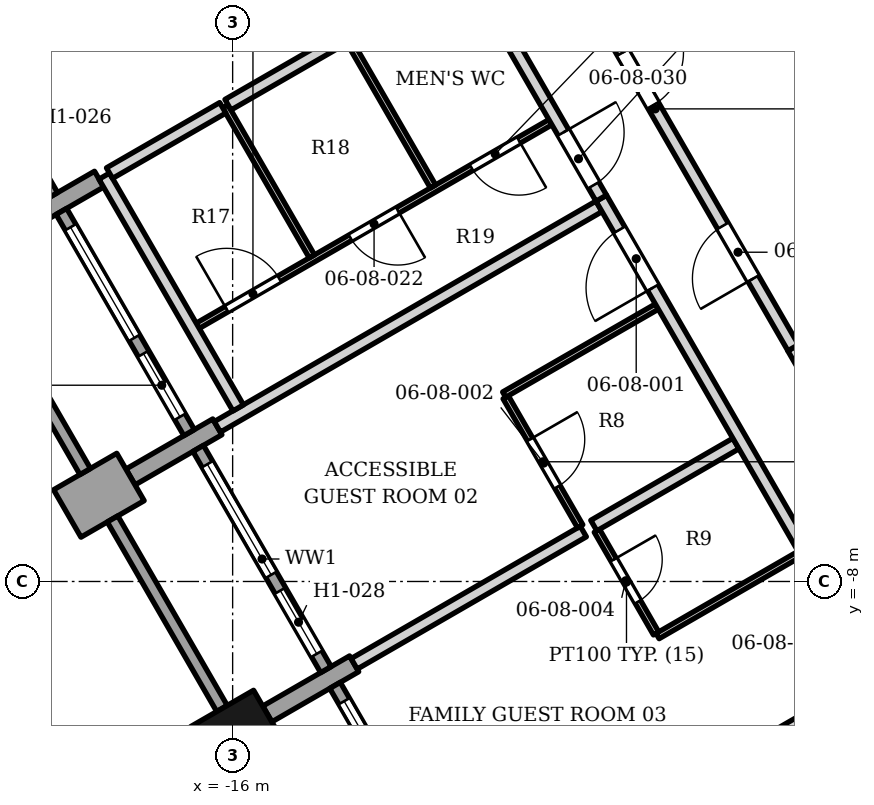
"""IFC4 building model, lengths in metres.
Left out: names, types, materials, properties, quantities, classifications, styles, units other than length and angle.
Written with IfcOpenShell. Run it as: python <this file> out.ifc"""

import sys

from ifc_helpers import new_model, si_unit, direction, frame, frame_2d, origin, origin_2d, place, context, subcontext, project, spatial, rectangle, extrude, element, fill, save


model = new_model("IFC4")
c1 = context("Model", 3, precision=1e-05, world=origin(), true_north=direction((0.0, 1.0)))
c2 = subcontext(c1, "Body", "Model", "MODEL_VIEW")
j1 = project(units=[si_unit("LENGTHUNIT", "METRE"), si_unit("PLANEANGLEUNIT", "RADIAN")], contexts=[c1])
p1 = place(None, origin())
s1 = spatial("IfcSite", under=j1, at=p1, CompositionType="ELEMENT")
p2 = place(p1, origin())
s2 = spatial("IfcBuilding", under=s1, at=p2, CompositionType="ELEMENT")
p3 = place(p2, frame((0.0, 0.0, 46.0)))
s3 = spatial("IfcBuildingStorey", under=s2, at=p3, CompositionType="ELEMENT", Elevation=46.0)
p4 = place(p3, frame((-15.95, -10.479, 0.0), z_axis=(0.0, 0.0, 1.0), x_axis=(0.5, -0.866025403784, 0.0)))
e1 = element("IfcColumn", 1, at=p4, inside=s3, PredefinedType="COLUMN", context=c2, shape_type="SweptSolid", body=[
    extrude(rectangle(XDim=0.9, YDim=1.2, at=origin_2d()), origin(), (0.0, 0.0, 1.0), 3.4),
])
p5 = place(p3, frame((-19.93, -2.384, 0.0), z_axis=(0.0, 0.0, 1.0), x_axis=(0.866057602843, 0.499944225447, 0.0)))
e2 = element("IfcWall", 2, at=p5, inside=s3, PredefinedType="SOLIDWALL", context=c2, shape_type="SweptSolid", body=[
    extrude(rectangle(XDim=2.001, YDim=0.3, at=frame_2d((1.0, 0.0))), origin(), (0.0, 0.0, 1.0), 2.65),
])
p6 = place(p3, frame((-18.72, -6.882, 0.0), z_axis=(0.0, 0.0, 1.0), x_axis=(0.866006032174, 0.500033551112, 0.0)))
e3 = element("IfcWall", 3, at=p6, inside=s3, PredefinedType="SOLIDWALL", context=c2, shape_type="SweptSolid", body=[
    extrude(rectangle(XDim=1.2, YDim=0.9, at=frame_2d((0.6, 0.0))), origin(), (0.0, 0.0, 1.0), 2.628),
])
for number, where, z_axis, x_axis in (
    (4, (-17.68, -6.282, 0.0), (0.0, 0.0, 1.0), (0.866, 0.5, 0.0)),
    (5, (-15.43, -10.179, 0.0), (0.0, 0.0, 1.0), (0.866, 0.5, 0.0)),
):
    element("IfcWall", number, at=place(p3, frame(where, z_axis=z_axis, x_axis=x_axis)), inside=s3, PredefinedType="SOLIDWALL", context=c2, shape_type="SweptSolid", body=[
        extrude(rectangle(XDim=1.65, YDim=0.3, at=frame_2d((0.825, 0.0))), origin(), (0.0, 0.0, 1.0), 2.65),
    ])
p7 = place(p3, frame((-21.066, 1.982, 0.0), z_axis=(0.0, 0.0, 1.0), x_axis=(0.500027713859, -0.866009402589, 0.0)))
e6 = element("IfcWall", 6, at=p7, inside=s3, PredefinedType="ELEMENTEDWALL", context=c2, shape_type="SweptSolid", body=[
    extrude(rectangle(XDim=4.2, YDim=0.2, at=frame_2d((2.1, 0.0))), origin(), (0.0, 0.0, 1.0), 2.65),
])
p8 = place(p7, frame((0.3, 0.0, 0.6)))
e7 = element("IfcOpeningElement", 7, at=p8, cuts=e6, PredefinedType="OPENING", context=c2, shape_type="SweptSolid", body=[
    extrude(rectangle(XDim=2.1, YDim=1.8, at=frame_2d((1.05, 0.9))), frame((0.0, 0.11, 0.0), z_axis=(0.0, -1.0, 0.0), x_axis=(1.0, 0.0, 0.0)), (0.0, 0.0, 1.0), 0.22),
])
p9 = place(p7, frame((2.7, 0.0, 0.0)))
e8 = element("IfcOpeningElement", 8, at=p9, cuts=e6, PredefinedType="OPENING", context=c2, shape_type="SweptSolid", body=[
    extrude(rectangle(XDim=1.2, YDim=2.4, at=frame_2d((0.6, 1.2))), frame((0.0, 0.11, 0.0), z_axis=(0.0, -1.0, 0.0), x_axis=(1.0, 0.0, 0.0)), (0.0, 0.0, 1.0), 0.22),
])
p10 = place(p3, frame((-20.225, -3.074, 0.0), z_axis=(0.0, 0.0, 1.0), x_axis=(0.500012057535, -0.866018442252, 0.0)))
e9 = element("IfcWall", 9, at=p10, inside=s3, PredefinedType="SOLIDWALL", context=c2, shape_type="SweptSolid", body=[
    extrude(rectangle(XDim=3.6, YDim=0.2, at=frame_2d((1.8, 0.0))), origin(), (0.0, 0.0, 1.0), 2.63),
])
p11 = place(p3, frame((-18.816, -1.915, 0.0), z_axis=(0.0, 0.0, 1.0), x_axis=(0.500002543286, -0.866023935413, 0.0)))
e10 = element("IfcWall", 10, at=p11, inside=s3, PredefinedType="ELEMENTEDWALL", context=c2, shape_type="SweptSolid", body=[
    extrude(rectangle(XDim=4.2, YDim=0.2, at=frame_2d((2.1, 0.0))), origin(), (0.0, 0.0, 1.0), 2.628),
])
p12 = place(p11, frame((0.3, 0.0, 0.6)))
e11 = element("IfcOpeningElement", 11, at=p12, cuts=e10, PredefinedType="OPENING", context=c2, shape_type="SweptSolid", body=[
    extrude(rectangle(XDim=2.1, YDim=1.8, at=frame_2d((1.05, 0.9))), frame((0.0, 0.11, 0.0), z_axis=(0.0, -1.0, 0.0), x_axis=(1.0, 0.0, 0.0)), (0.0, 0.0, 1.0), 0.22),
])
p13 = place(p11, frame((2.7, 0.0, 0.0)))
e12 = element("IfcOpeningElement", 12, at=p13, cuts=e10, PredefinedType="OPENING", context=c2, shape_type="SweptSolid", body=[
    extrude(rectangle(XDim=1.2, YDim=2.4, at=frame_2d((0.6, 1.2))), frame((0.0, 0.11, 0.0), z_axis=(0.0, -1.0, 0.0), x_axis=(1.0, 0.0, 0.0)), (0.0, 0.0, 1.0), 0.22),
])
p14 = place(p3, frame((-17.975, -6.971, 0.0), z_axis=(0.0, 0.0, 1.0), x_axis=(0.500012057535, -0.866018442252, 0.0)))
e13 = element("IfcWall", 13, at=p14, inside=s3, PredefinedType="SOLIDWALL", context=c2, shape_type="SweptSolid", body=[
    extrude(rectangle(XDim=3.6, YDim=0.2, at=frame_2d((1.8, 0.0))), origin(), (0.0, 0.0, 1.0), 2.63),
])
p15 = place(p3, frame((-16.566, -5.812, 0.0), z_axis=(0.0, 0.0, 1.0), x_axis=(0.500027713859, -0.866009402589, 0.0)))
e14 = element("IfcWall", 14, at=p15, inside=s3, PredefinedType="ELEMENTEDWALL", context=c2, shape_type="SweptSolid", body=[
    extrude(rectangle(XDim=4.2, YDim=0.2, at=frame_2d((2.1, 0.0))), origin(), (0.0, 0.0, 1.0), 2.65),
])
p16 = place(p15, frame((0.3, 0.0, 0.6)))
e15 = element("IfcOpeningElement", 15, at=p16, cuts=e14, PredefinedType="OPENING", context=c2, shape_type="SweptSolid", body=[
    extrude(rectangle(XDim=2.1, YDim=1.8, at=frame_2d((1.05, 0.9))), frame((0.0, 0.11, 0.0), z_axis=(0.0, -1.0, 0.0), x_axis=(1.0, 0.0, 0.0)), (0.0, 0.0, 1.0), 0.22),
])
p17 = place(p15, frame((2.7, 0.0, 0.0)))
e16 = element("IfcOpeningElement", 16, at=p17, cuts=e14, PredefinedType="OPENING", context=c2, shape_type="SweptSolid", body=[
    extrude(rectangle(XDim=1.2, YDim=2.4, at=frame_2d((0.6, 1.2))), frame((0.0, 0.11, 0.0), z_axis=(0.0, -1.0, 0.0), x_axis=(1.0, 0.0, 0.0)), (0.0, 0.0, 1.0), 0.22),
])
p18 = place(p3, frame((-14.316, -9.709, 0.0), z_axis=(0.0, 0.0, 1.0), x_axis=(0.500002543286, -0.866023935413, 0.0)))
e17 = element("IfcWall", 17, at=p18, inside=s3, PredefinedType="ELEMENTEDWALL", context=c2, shape_type="SweptSolid", body=[
    extrude(rectangle(XDim=4.2, YDim=0.2, at=frame_2d((2.1, 0.0))), origin(), (0.0, 0.0, 1.0), 2.302),
])
p19 = place(p18, frame((0.3, 0.0, 0.6)))
e18 = element("IfcOpeningElement", 18, at=p19, cuts=e17, PredefinedType="OPENING", context=c2, shape_type="SweptSolid", body=[
    extrude(rectangle(XDim=2.1, YDim=1.6, at=frame_2d((1.05, 0.8))), frame((0.0, 0.11, 0.0), z_axis=(0.0, -1.0, 0.0), x_axis=(1.0, 0.0, 0.0)), (0.0, 0.0, 1.0), 0.22),
])
p20 = place(p18, frame((2.7, 0.0, 0.0)))
e19 = element("IfcOpeningElement", 19, at=p20, cuts=e17, PredefinedType="OPENING", context=c2, shape_type="SweptSolid", body=[
    extrude(rectangle(XDim=1.2, YDim=2.2, at=frame_2d((0.6, 1.1))), frame((0.0, 0.11, 0.0), z_axis=(0.0, -1.0, 0.0), x_axis=(1.0, 0.0, 0.0)), (0.0, 0.0, 1.0), 0.22),
])
p21 = place(p3, frame((-11.751, -13.251, 0.0), z_axis=(0.0, 0.0, 1.0), x_axis=(0.866134002969, 0.499811853502, 0.0)))
e20 = element("IfcWall", 20, at=p21, inside=s3, PredefinedType="PARTITIONING", context=c2, shape_type="SweptSolid", body=[
    extrude(rectangle(XDim=7.25, YDim=0.2, at=frame_2d((3.625, 0.0))), origin(), (0.0, 0.0, 1.0), 2.302),
])
p22 = place(p21, frame((1.3, 0.0, 0.0)))
e21 = element("IfcOpeningElement", 21, at=p22, cuts=e20, PredefinedType="OPENING", context=c2, shape_type="SweptSolid", body=[
    extrude(rectangle(XDim=0.9, YDim=2.1, at=frame_2d((0.45, 1.05))), frame((0.0, 0.11, 0.0), z_axis=(0.0, -1.0, 0.0), x_axis=(1.0, 0.0, 0.0)), (0.0, 0.0, 1.0), 0.22),
])
p23 = place(p3, frame((-9.011, -8.898, 0.0), z_axis=(0.0, 0.0, 1.0), x_axis=(0.865671764241, 0.500612022024, 0.0)))
e22 = element("IfcWall", 22, at=p23, inside=s3, PredefinedType="PARTITIONING", context=c2, shape_type="SweptSolid", body=[
    extrude(rectangle(XDim=2.7, YDim=0.1, at=frame_2d((1.35, 0.0))), origin(), (0.0, 0.0, 1.0), 2.552),
])
p24 = place(p3, frame((-14.001, -9.354, 0.0), z_axis=(0.0, 0.0, 1.0), x_axis=(0.866024887666, 0.500000893942, 0.0)))
e23 = element("IfcWall", 23, at=p24, inside=s3, PredefinedType="PARTITIONING", context=c2, shape_type="SweptSolid", body=[
    extrude(rectangle(XDim=4.352, YDim=0.2, at=frame_2d((2.176, 0.0))), origin(), (0.0, 0.0, 1.0), 2.384),
])
p25 = place(p3, frame((-10.01, -7.165, 0.0), z_axis=(0.0, 0.0, 1.0), x_axis=(0.499317740681, -0.866418948224, 0.0)))
e24 = element("IfcWall", 24, at=p25, inside=s3, PredefinedType="PARTITIONING", context=c2, shape_type="SweptSolid", body=[
    extrude(rectangle(XDim=1.95, YDim=0.1, at=frame_2d((0.975, 0.0))), origin(), (0.0, 0.0, 1.0), 2.552),
])
p26 = place(p25, frame((0.55, 0.0, 0.0)))
e25 = element("IfcOpeningElement", 25, at=p26, cuts=e24, PredefinedType="OPENING", context=c2, shape_type="SweptSolid", body=[
    extrude(rectangle(XDim=0.8, YDim=2.1, at=frame_2d((0.4, 1.05))), frame((0.0, 0.06, 0.0), z_axis=(0.0, -1.0, 0.0), x_axis=(1.0, 0.0, 0.0)), (0.0, 0.0, 1.0), 0.12),
])
p27 = place(p3, frame((-10.06, -7.081, 0.0), z_axis=(0.0, 0.0, 1.0), x_axis=(0.866036505625, 0.499980770555, 0.0)))
e26 = element("IfcWall", 26, at=p27, inside=s3, PredefinedType="PARTITIONING", context=c2, shape_type="SweptSolid", body=[
    extrude(rectangle(XDim=2.7, YDim=0.2, at=frame_2d((1.35, 0.0))), origin(), (0.0, 0.0, 1.0), 2.552),
])
p28 = place(p3, frame((-11.509, -4.97, 0.0), z_axis=(0.0, 0.0, 1.0), x_axis=(0.500018594424, -0.866014668023, 0.0)))
e27 = element("IfcWall", 27, at=p28, inside=s3, PredefinedType="PARTITIONING", context=c2, shape_type="SweptSolid", body=[
    extrude(rectangle(XDim=2.45, YDim=0.1, at=frame_2d((1.225, 0.0))), origin(), (0.0, 0.0, 1.0), 3.23),
])
p29 = place(p28, frame((0.8, 0.0, 0.0)))
e28 = element("IfcOpeningElement", 28, at=p29, cuts=e27, PredefinedType="OPENING", context=c2, shape_type="SweptSolid", body=[
    extrude(rectangle(XDim=0.9, YDim=2.1, at=frame_2d((0.45, 1.05))), frame((0.0, 0.06, 0.0), z_axis=(0.0, -1.0, 0.0), x_axis=(1.0, 0.0, 0.0)), (0.0, 0.0, 1.0), 0.12),
])
p30 = place(p3, frame((-6.783, -4.156, 0.0), z_axis=(0.0, 0.0, 1.0), x_axis=(0.500162761554, -0.865931412962, 0.0)))
e29 = element("IfcWall", 29, at=p30, inside=s3, PredefinedType="PARTITIONING", context=c2, shape_type="SweptSolid", body=[
    extrude(rectangle(XDim=13.566, YDim=0.2, at=frame_2d((6.783, 0.0))), origin(), (0.0, 0.0, 1.0), 2.302),
])
p31 = place(p30, frame((4.642, 0.0, 0.0)))
e30 = element("IfcOpeningElement", 30, at=p31, cuts=e29, PredefinedType="OPENING", context=c2, shape_type="SweptSolid", body=[
    extrude(rectangle(XDim=0.9, YDim=2.1, at=frame_2d((0.45, 1.05))), frame((0.0, 0.11, 0.0), z_axis=(0.0, -1.0, 0.0), x_axis=(1.0, 0.0, 0.0)), (0.0, 0.0, 1.0), 0.22),
])
p32 = place(p3, frame((-16.574, -3.795, 0.0), z_axis=(0.0, 0.0, 1.0), x_axis=(0.866015588977, 0.500016999361, 0.0)))
e31 = element("IfcWall", 31, at=p32, inside=s3, PredefinedType="PARTITIONING", context=c2, shape_type="SweptSolid", body=[
    extrude(rectangle(XDim=6.697, YDim=0.1, at=frame_2d((3.348, 0.0))), origin(), (0.0, 0.0, 1.0), 2.384),
])
p33 = place(p32, frame((5.198, 0.0, 0.0)))
e32 = element("IfcOpeningElement", 32, at=p33, cuts=e31, PredefinedType="OPENING", context=c2, shape_type="SweptSolid", body=[
    extrude(rectangle(XDim=0.9, YDim=2.1, at=frame_2d((0.45, 1.05))), frame((0.0, 0.06, 0.0), z_axis=(0.0, -1.0, 0.0), x_axis=(1.0, 0.0, 0.0)), (0.0, 0.0, 1.0), 0.12),
])
p34 = place(p32, frame((2.898, 0.0, 0.0)))
e33 = element("IfcOpeningElement", 33, at=p34, cuts=e31, PredefinedType="OPENING", context=c2, shape_type="SweptSolid", body=[
    extrude(rectangle(XDim=0.9, YDim=2.1, at=frame_2d((0.45, 1.05))), frame((0.0, 0.06, 0.0), z_axis=(0.0, -1.0, 0.0), x_axis=(1.0, 0.0, 0.0)), (0.0, 0.0, 1.0), 0.12),
])
p35 = place(p32, frame((0.548, 0.0, 0.0)))
e34 = element("IfcOpeningElement", 34, at=p35, cuts=e31, PredefinedType="OPENING", context=c2, shape_type="SweptSolid", body=[
    extrude(rectangle(XDim=1.0, YDim=2.1, at=frame_2d((0.5, 1.05))), frame((0.0, 0.06, 0.0), z_axis=(0.0, -1.0, 0.0), x_axis=(1.0, 0.0, 0.0)), (0.0, 0.0, 1.0), 0.12),
])
p36 = place(p3, frame((-11.534, -4.927, 0.0), z_axis=(0.0, 0.0, 1.0), x_axis=(0.866293497561, 0.499535360193, 0.0)))
e35 = element("IfcWall", 35, at=p36, inside=s3, PredefinedType="PARTITIONING", context=c2, shape_type="SweptSolid", body=[
    extrude(rectangle(XDim=2.9, YDim=0.1, at=frame_2d((1.45, 0.0))), origin(), (0.0, 0.0, 1.0), 2.552),
])
p37 = place(p3, frame((-16.122, -0.185, 0.0), z_axis=(0.0, 0.0, 1.0), x_axis=(0.500026428979, -0.866010144469, 0.0)))
e36 = element("IfcWall", 36, at=p37, inside=s3, PredefinedType="PARTITIONING", context=c2, shape_type="SweptSolid", body=[
    extrude(rectangle(XDim=2.85, YDim=0.1, at=frame_2d((1.425, 0.0))), origin(), (0.0, 0.0, 1.0), 3.23),
])
p38 = place(p3, frame((-16.251, -5.457, 0.0), z_axis=(0.0, 0.0, 1.0), x_axis=(0.865900080757, 0.500217003055, 0.0)))
e37 = element("IfcWall", 37, at=p38, inside=s3, PredefinedType="PARTITIONING", context=c2, shape_type="SweptSolid", body=[
    extrude(rectangle(XDim=7.25, YDim=0.2, at=frame_2d((3.625, 0.0))), origin(), (0.0, 0.0, 1.0), 2.384),
])
p39 = place(p3, frame((-9.937, -1.698, 0.0), z_axis=(0.0, 0.0, 1.0), x_axis=(0.500001173101, -0.866024726493, 0.0)))
e38 = element("IfcWall", 38, at=p39, inside=s3, PredefinedType="PARTITIONING", context=c2, shape_type="SweptSolid", body=[
    extrude(rectangle(XDim=13.598, YDim=0.2, at=frame_2d((6.799, 0.0))), origin(), (0.0, 0.0, 1.0), 2.302),
])
p40 = place(p39, frame((0.598, 0.0, 0.0)))
e39 = element("IfcOpeningElement", 39, at=p40, cuts=e38, PredefinedType="OPENING", context=c2, shape_type="SweptSolid", body=[
    extrude(rectangle(XDim=1.1, YDim=2.1, at=frame_2d((0.55, 1.05))), frame((0.0, 0.11, 0.0), z_axis=(0.0, -1.0, 0.0), x_axis=(1.0, 0.0, 0.0)), (0.0, 0.0, 1.0), 0.22),
])
p41 = place(p39, frame((7.398, 0.0, 0.0)))
e40 = element("IfcOpeningElement", 40, at=p41, cuts=e38, PredefinedType="OPENING", context=c2, shape_type="SweptSolid", body=[
    extrude(rectangle(XDim=1.0, YDim=2.1, at=frame_2d((0.5, 1.05))), frame((0.0, 0.11, 0.0), z_axis=(0.0, -1.0, 0.0), x_axis=(1.0, 0.0, 0.0)), (0.0, 0.0, 1.0), 0.22),
])
p42 = place(p39, frame((9.798, 0.0, 0.0)))
e41 = element("IfcOpeningElement", 41, at=p42, cuts=e38, PredefinedType="OPENING", context=c2, shape_type="SweptSolid", body=[
    extrude(rectangle(XDim=1.0, YDim=2.1, at=frame_2d((0.5, 1.05))), frame((0.0, 0.11, 0.0), z_axis=(0.0, -1.0, 0.0), x_axis=(1.0, 0.0, 0.0)), (0.0, 0.0, 1.0), 0.22),
])
p43 = place(p3, frame((-12.137, 2.113, 0.0), z_axis=(0.0, 0.0, 1.0), x_axis=(0.500025132165, -0.866010893236, 0.0)))
e42 = element("IfcWall", 42, at=p43, inside=s3, PredefinedType="PARTITIONING", context=c2, shape_type="SweptSolid", body=[
    extrude(rectangle(XDim=4.399, YDim=0.2, at=frame_2d((2.199, 0.0))), origin(), (0.0, 0.0, 1.0), 3.23),
])
p44 = place(p43, frame((3.15, 0.0, 0.0)))
e43 = element("IfcOpeningElement", 43, at=p44, cuts=e42, PredefinedType="OPENING", context=c2, shape_type="SweptSolid", body=[
    extrude(rectangle(XDim=1.0, YDim=2.1, at=frame_2d((0.5, 1.05))), frame((0.0, 0.11, 0.0), z_axis=(0.0, -1.0, 0.0), x_axis=(1.0, 0.0, 0.0)), (0.0, 0.0, 1.0), 0.22),
])
p45 = place(p3, frame((-14.13, 0.965, 0.0), z_axis=(0.0, 0.0, 1.0), x_axis=(0.499962189394, -0.866047232647, 0.0)))
e44 = element("IfcWall", 44, at=p45, inside=s3, PredefinedType="PARTITIONING", context=c2, shape_type="SweptSolid", body=[
    extrude(rectangle(XDim=2.85, YDim=0.1, at=frame_2d((1.425, 0.0))), origin(), (0.0, 0.0, 1.0), 2.384),
])
p46 = place(p3, frame((-18.112, -1.334, 0.0), z_axis=(0.0, 0.0, 1.0), x_axis=(0.500522433527, -0.865723566467, 0.0)))
e45 = element("IfcWall", 45, at=p46, inside=s3, PredefinedType="PARTITIONING", context=c2, shape_type="SweptSolid", body=[
    extrude(rectangle(XDim=4.402, YDim=0.2, at=frame_2d((2.201, 0.0))), origin(), (0.0, 0.0, 1.0), 2.628),
])
p47 = place(p3, frame((-18.025, -1.284, 0.0), z_axis=(0.0, 0.0, 1.0), x_axis=(0.866399153158, 0.499352087617, 0.0)))
e46 = element("IfcWall", 46, at=p47, inside=s3, PredefinedType="PARTITIONING", context=c2, shape_type="SweptSolid", body=[
    extrude(rectangle(XDim=2.15, YDim=0.2, at=frame_2d((1.075, 0.0))), origin(), (0.0, 0.0, 1.0), 2.628),
])
p48 = place(p3, frame((-16.077, -0.159, 0.0), z_axis=(0.0, 0.0, 1.0), x_axis=(0.866399851823, 0.499350875398, 0.0)))
e47 = element("IfcWall", 47, at=p48, inside=s3, PredefinedType="PARTITIONING", context=c2, shape_type="SweptSolid", body=[
    extrude(rectangle(XDim=2.2, YDim=0.2, at=frame_2d((1.1, 0.0))), origin(), (0.0, 0.0, 1.0), 3.23),
])
p49 = place(p3, frame((-11.319, 3.7, 0.0), z_axis=(0.0, 0.0, 1.0), x_axis=(0.500165052219, -0.865930089868, 0.0)))
e48 = element("IfcWall", 48, at=p49, inside=s3, PredefinedType="PARTITIONING", context=c2, shape_type="SweptSolid", body=[
    extrude(rectangle(XDim=9.072, YDim=0.2, at=frame_2d((4.536, 0.0))), origin(), (0.0, 0.0, 1.0), 2.552),
])
p50 = place(p49, frame((6.758, 0.0, 0.0)))
e49 = element("IfcOpeningElement", 49, at=p50, cuts=e48, PredefinedType="OPENING", context=c2, shape_type="SweptSolid", body=[
    extrude(rectangle(XDim=1.0, YDim=2.1, at=frame_2d((0.5, 1.05))), frame((0.0, 0.11, 0.0), z_axis=(0.0, -1.0, 0.0), x_axis=(1.0, 0.0, 0.0)), (0.0, 0.0, 1.0), 0.22),
])
p51 = place(p49, frame((3.466, 0.0, 0.0)))
e50 = element("IfcOpeningElement", 50, at=p51, cuts=e48, PredefinedType="OPENING", context=c2, shape_type="SweptSolid", body=[
    extrude(rectangle(XDim=1.0, YDim=2.1, at=frame_2d((0.5, 1.05))), frame((0.0, 0.11, 0.0), z_axis=(0.0, -1.0, 0.0), x_axis=(1.0, 0.0, 0.0)), (0.0, 0.0, 1.0), 0.22),
])
p52 = place(p12, origin())
e51 = element("IfcWindow", 51, at=p52, inside=s3, PartitioningType="SINGLE_PANEL", PredefinedType="WINDOW", context=c2, shape_type="SweptSolid", body=[
    extrude(rectangle(XDim=2.1, YDim=1.8, at=frame_2d((1.05, 0.9))), frame((0.0, 0.03, 0.0), z_axis=(0.0, -1.0, 0.0), x_axis=(1.0, 0.0, 0.0)), (0.0, 0.0, 1.0), 0.06),
])
fill(e11, e51)
p53 = place(p13, origin())
e52 = element("IfcDoor", 52, at=p53, inside=s3, OperationType="SINGLE_SWING_LEFT", PredefinedType="DOOR", context=c2, shape_type="SweptSolid", body=[
    extrude(rectangle(XDim=1.2, YDim=2.4, at=frame_2d((0.6, 1.2))), frame((0.0, 0.025, 0.0), z_axis=(0.0, -1.0, 0.0), x_axis=(1.0, 0.0, 0.0)), (0.0, 0.0, 1.0), 0.05),
])
fill(e12, e52)
p54 = place(p16, origin())
e53 = element("IfcWindow", 53, at=p54, inside=s3, PartitioningType="SINGLE_PANEL", PredefinedType="WINDOW", context=c2, shape_type="SweptSolid", body=[
    extrude(rectangle(XDim=2.1, YDim=1.8, at=frame_2d((1.05, 0.9))), frame((0.0, 0.03, 0.0), z_axis=(0.0, -1.0, 0.0), x_axis=(1.0, 0.0, 0.0)), (0.0, 0.0, 1.0), 0.06),
])
fill(e15, e53)
p55 = place(p17, origin())
e54 = element("IfcDoor", 54, at=p55, inside=s3, OperationType="SINGLE_SWING_LEFT", PredefinedType="DOOR", context=c2, shape_type="SweptSolid", body=[
    extrude(rectangle(XDim=1.2, YDim=2.4, at=frame_2d((0.6, 1.2))), frame((0.0, 0.025, 0.0), z_axis=(0.0, -1.0, 0.0), x_axis=(1.0, 0.0, 0.0)), (0.0, 0.0, 1.0), 0.05),
])
fill(e16, e54)
p56 = place(p19, origin())
e55 = element("IfcWindow", 55, at=p56, inside=s3, PartitioningType="SINGLE_PANEL", PredefinedType="WINDOW", context=c2, shape_type="SweptSolid", body=[
    extrude(rectangle(XDim=2.1, YDim=1.6, at=frame_2d((1.05, 0.8))), frame((0.0, 0.03, 0.0), z_axis=(0.0, -1.0, 0.0), x_axis=(1.0, 0.0, 0.0)), (0.0, 0.0, 1.0), 0.06),
])
fill(e18, e55)
p57 = place(p40, origin())
e56 = element("IfcDoor", 56, at=p57, inside=s3, OperationType="SINGLE_SWING_RIGHT", PredefinedType="DOOR", context=c2, shape_type="SweptSolid", body=[
    extrude(rectangle(XDim=1.1, YDim=2.1, at=frame_2d((0.55, 1.05))), frame((0.0, 0.025, 0.0), z_axis=(0.0, -1.0, 0.0), x_axis=(1.0, 0.0, 0.0)), (0.0, 0.0, 1.0), 0.05),
])
fill(e39, e56)
p58 = place(p29, origin())
e57 = element("IfcDoor", 57, at=p58, inside=s3, OperationType="SINGLE_SWING_LEFT", PredefinedType="DOOR", context=c2, shape_type="SweptSolid", body=[
    extrude(rectangle(XDim=0.9, YDim=2.1, at=frame_2d((0.45, 1.05))), frame((0.0, 0.025, 0.0), z_axis=(0.0, -1.0, 0.0), x_axis=(1.0, 0.0, 0.0)), (0.0, 0.0, 1.0), 0.05),
])
fill(e28, e57)
p59 = place(p26, origin())
e58 = element("IfcDoor", 58, at=p59, inside=s3, OperationType="SINGLE_SWING_LEFT", PredefinedType="DOOR", context=c2, shape_type="SweptSolid", body=[
    extrude(rectangle(XDim=0.8, YDim=2.1, at=frame_2d((0.4, 1.05))), frame((0.0, 0.025, 0.0), z_axis=(0.0, -1.0, 0.0), x_axis=(1.0, 0.0, 0.0)), (0.0, 0.0, 1.0), 0.05),
])
fill(e25, e58)
p60 = place(p50, origin())
e59 = element("IfcDoor", 59, at=p60, inside=s3, OperationType="SINGLE_SWING_RIGHT", PredefinedType="DOOR", context=c2, shape_type="SweptSolid", body=[
    extrude(rectangle(XDim=1.0, YDim=2.1, at=frame_2d((0.5, 1.05))), frame((0.0, 0.025, 0.0), z_axis=(0.0, -1.0, 0.0), x_axis=(1.0, 0.0, 0.0)), (0.0, 0.0, 1.0), 0.05),
])
fill(e49, e59)
p61 = place(p44, origin())
e60 = element("IfcDoor", 60, at=p61, inside=s3, OperationType="SINGLE_SWING_LEFT", PredefinedType="DOOR", context=c2, shape_type="SweptSolid", body=[
    extrude(rectangle(XDim=1.0, YDim=2.1, at=frame_2d((0.5, 1.05))), frame((0.0, 0.025, 0.0), z_axis=(0.0, -1.0, 0.0), x_axis=(1.0, 0.0, 0.0)), (0.0, 0.0, 1.0), 0.05),
])
fill(e43, e60)
p62 = place(p33, origin())
e61 = element("IfcDoor", 61, at=p62, inside=s3, OperationType="SINGLE_SWING_RIGHT", PredefinedType="DOOR", context=c2, shape_type="SweptSolid", body=[
    extrude(rectangle(XDim=0.9, YDim=2.1, at=frame_2d((0.45, 1.05))), frame((0.0, 0.025, 0.0), z_axis=(0.0, -1.0, 0.0), x_axis=(1.0, 0.0, 0.0)), (0.0, 0.0, 1.0), 0.05),
])
fill(e32, e61)
p63 = place(p34, origin())
e62 = element("IfcDoor", 62, at=p63, inside=s3, OperationType="SINGLE_SWING_RIGHT", PredefinedType="DOOR", context=c2, shape_type="SweptSolid", body=[
    extrude(rectangle(XDim=0.9, YDim=2.1, at=frame_2d((0.45, 1.05))), frame((0.0, 0.025, 0.0), z_axis=(0.0, -1.0, 0.0), x_axis=(1.0, 0.0, 0.0)), (0.0, 0.0, 1.0), 0.05),
])
fill(e33, e62)
p64 = place(p35, origin())
e63 = element("IfcDoor", 63, at=p64, inside=s3, OperationType="SINGLE_SWING_LEFT", PredefinedType="DOOR", context=c2, shape_type="SweptSolid", body=[
    extrude(rectangle(XDim=1.0, YDim=2.1, at=frame_2d((0.5, 1.05))), frame((0.0, 0.025, 0.0), z_axis=(0.0, -1.0, 0.0), x_axis=(1.0, 0.0, 0.0)), (0.0, 0.0, 1.0), 0.05),
])
fill(e34, e63)
p65 = place(p51, origin())
e64 = element("IfcDoor", 64, at=p65, inside=s3, OperationType="SINGLE_SWING_LEFT", PredefinedType="DOOR", context=c2, shape_type="SweptSolid", body=[
    extrude(rectangle(XDim=1.0, YDim=2.1, at=frame_2d((0.5, 1.05))), frame((0.0, 0.025, 0.0), z_axis=(0.0, -1.0, 0.0), x_axis=(1.0, 0.0, 0.0)), (0.0, 0.0, 1.0), 0.05),
])
fill(e50, e64)
save(model, sys.argv[1])
